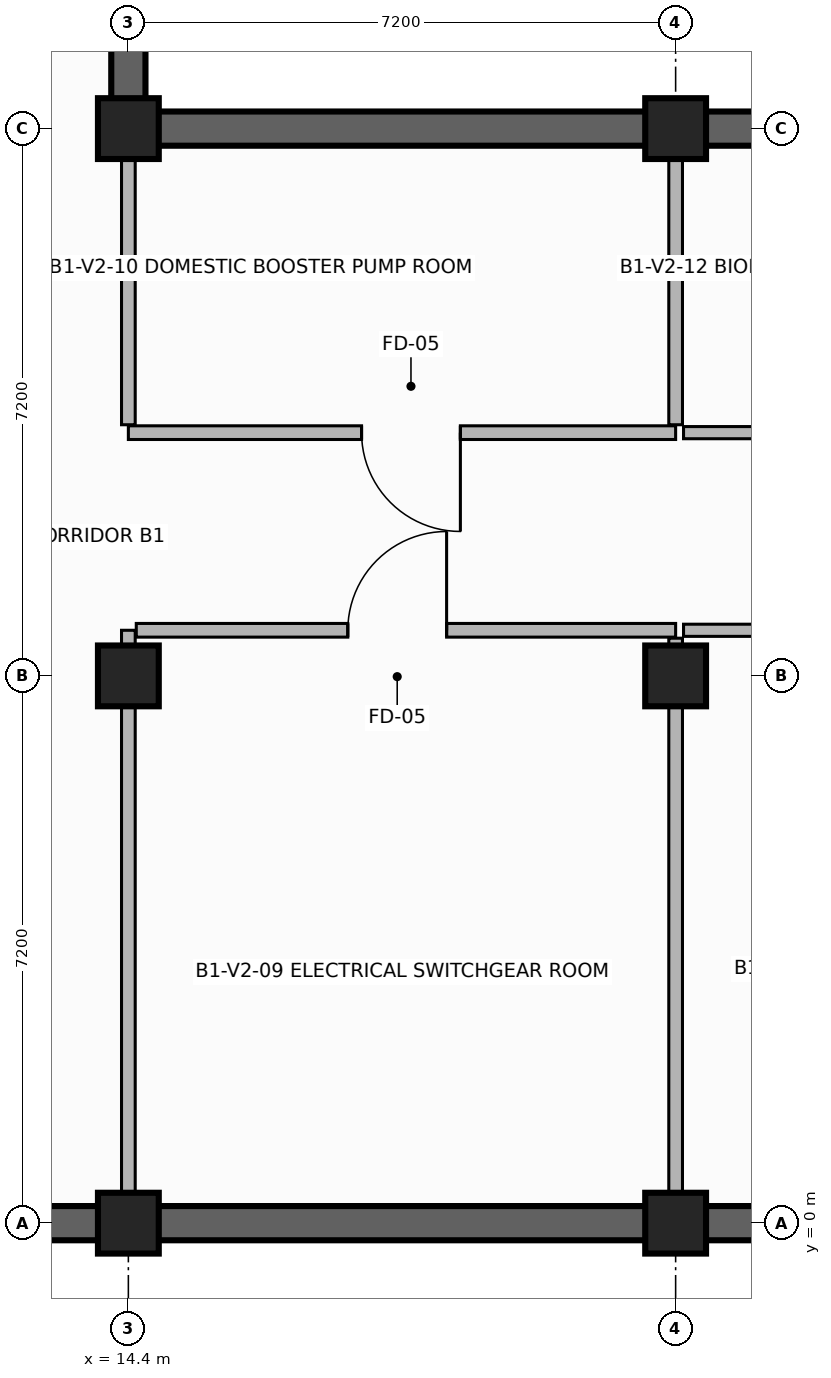
"""IFC4 building model, lengths in metres.
Left out: names, types, materials, properties, quantities, classifications, styles, units other than length and angle.
Written with IfcOpenShell. Run it as: python <this file> out.ifc"""

import sys

from ifc_helpers import new_model, si_unit, direction, frame, frame_2d, origin, origin_2d, place, context, subcontext, project, spatial, rectangle, extrude, element, fill, save


model = new_model("IFC4")
c1 = context("Model", 3, precision=1e-05, world=origin(), true_north=direction((0.0, 1.0)))
c2 = subcontext(c1, "Body", "Model", "MODEL_VIEW")
j1 = project(units=[si_unit("LENGTHUNIT", "METRE"), si_unit("PLANEANGLEUNIT", "RADIAN")], contexts=[c1])
p1 = place(None, origin())
s1 = spatial("IfcSite", under=j1, at=p1, CompositionType="ELEMENT")
p2 = place(p1, origin())
s2 = spatial("IfcBuilding", under=s1, at=p2, CompositionType="ELEMENT")
p3 = place(p2, frame((0.0, 0.0, -4.2)))
s3 = spatial("IfcBuildingStorey", under=s2, at=p3, CompositionType="ELEMENT", Elevation=-4.2)
for number, where, z_axis, x_axis in (
    (1, (14.4, 0.0, -0.4), (0.0, 0.0, 1.0), (1.0, 0.0, 0.0)),
    (2, (14.4, 7.2, -0.4), (0.0, 0.0, 1.0), (1.0, 0.0, 0.0)),
    (3, (14.4, 14.4, -0.4), (0.0, 0.0, 1.0), (1.0, 0.0, 0.0)),
    (4, (21.6, 0.0, -0.4), (0.0, 0.0, 1.0), (1.0, 0.0, 0.0)),
    (5, (21.6, 7.2, -0.4), (0.0, 0.0, 1.0), (1.0, 0.0, 0.0)),
    (6, (21.6, 14.4, -0.4), (0.0, 0.0, 1.0), (1.0, 0.0, 0.0)),
):
    element("IfcColumn", number, at=place(p3, frame(where, z_axis=z_axis, x_axis=x_axis)), inside=s3, PredefinedType="COLUMN", context=c2, shape_type="SweptSolid", body=[
        extrude(rectangle(XDim=0.8, YDim=0.8, at=origin_2d()), origin(), (0.0, 0.0, 1.0), 4.32),
    ])
p4 = place(p3, frame((7.2, 0.0, 0.0), z_axis=(0.0, 0.0, 1.0), x_axis=(1.0, 0.0, 0.0)))
e7 = element("IfcWall", 7, at=p4, inside=s3, PredefinedType="ELEMENTEDWALL", context=c2, shape_type="SweptSolid", body=[
    extrude(rectangle(XDim=7.2, YDim=0.45, at=frame_2d((3.6, 0.0))), origin(), (0.0, 0.0, 1.0), 3.32),
])
p5 = place(p3, frame((14.4, 0.0, 0.0), z_axis=(0.0, 0.0, 1.0), x_axis=(1.0, 0.0, 0.0)))
e8 = element("IfcWall", 8, at=p5, inside=s3, PredefinedType="ELEMENTEDWALL", context=c2, shape_type="SweptSolid", body=[
    extrude(rectangle(XDim=7.2, YDim=0.45, at=frame_2d((3.6, 0.0))), origin(), (0.0, 0.0, 1.0), 3.32),
])
for number, where, z_axis, x_axis in (
    (9, (21.6, 0.0, 0.0), (0.0, 0.0, 1.0), (1.0, 0.0, 0.0)),
    (10, (28.8, 14.4, 0.0), (0.0, 0.0, 1.0), (-1.0, 0.0, 0.0)),
):
    element("IfcWall", number, at=place(p3, frame(where, z_axis=z_axis, x_axis=x_axis)), inside=s3, PredefinedType="ELEMENTEDWALL", context=c2, shape_type="SweptSolid", body=[
        extrude(rectangle(XDim=7.2, YDim=0.45, at=frame_2d((3.6, 0.0))), origin(), (0.0, 0.0, 1.0), 3.32),
    ])
for number, where, z_axis, x_axis in (
    (11, (21.6, 14.4, 0.0), (0.0, 0.0, 1.0), (-1.0, 0.0, 0.0)),
    (12, (14.4, 14.4, 0.0), (0.0, 0.0, 1.0), (0.0, 1.0, 0.0)),
):
    element("IfcWall", number, at=place(p3, frame(where, z_axis=z_axis, x_axis=x_axis)), inside=s3, PredefinedType="ELEMENTEDWALL", context=c2, shape_type="SweptSolid", body=[
        extrude(rectangle(XDim=7.2, YDim=0.45, at=frame_2d((3.6, 0.0))), origin(), (0.0, 0.0, 1.0), 3.32),
    ])
p6 = place(p3, frame((14.4, 0.24, 0.0), z_axis=(0.0, 0.0, 1.0), x_axis=(0.0, 1.0, 0.0)))
e13 = element("IfcWall", 13, at=p6, inside=s3, PredefinedType="PARTITIONING", context=c2, shape_type="SweptSolid", body=[
    extrude(rectangle(XDim=7.56, YDim=0.18, at=frame_2d((3.78, 0.0))), origin(), (0.0, 0.0, 1.0), 3.26),
])
p7 = place(p3, frame((14.504, 7.8, 0.0), z_axis=(0.0, 0.0, 1.0), x_axis=(1.0, 0.0, 0.0)))
e14 = element("IfcWall", 14, at=p7, inside=s3, PredefinedType="PARTITIONING", context=c2, shape_type="SweptSolid", body=[
    extrude(rectangle(XDim=7.096, YDim=0.18, at=frame_2d((3.548, 0.0))), origin(), (0.0, 0.0, 1.0), 3.26),
])
p8 = place(p7, frame((2.783, 0.0, 0.0)))
e15 = element("IfcOpeningElement", 15, at=p8, cuts=e14, PredefinedType="OPENING", context=c2, shape_type="SweptSolid", body=[
    extrude(rectangle(XDim=1.3, YDim=2.2, at=frame_2d((0.65, 1.1))), frame((0.0, 0.1, 0.0), z_axis=(0.0, -1.0, 0.0), x_axis=(1.0, 0.0, 0.0)), (0.0, 0.0, 1.0), 0.2),
])
p9 = place(p3, frame((21.6, 7.696, 0.0), z_axis=(0.0, 0.0, 1.0), x_axis=(0.0, -1.0, 0.0)))
e16 = element("IfcWall", 16, at=p9, inside=s3, PredefinedType="PARTITIONING", context=c2, shape_type="SweptSolid", body=[
    extrude(rectangle(XDim=7.456, YDim=0.18, at=frame_2d((3.728, 0.0))), origin(), (0.0, 0.0, 1.0), 3.26),
])
p10 = place(p3, frame((21.6, 10.4, 0.0), z_axis=(0.0, 0.0, 1.0), x_axis=(-1.0, 0.0, 0.0)))
e17 = element("IfcWall", 17, at=p10, inside=s3, PredefinedType="PARTITIONING", context=c2, shape_type="SweptSolid", body=[
    extrude(rectangle(XDim=7.2, YDim=0.18, at=frame_2d((3.6, 0.0))), origin(), (0.0, 0.0, 1.0), 3.26),
])
p11 = place(p10, frame((2.832, 0.0, 0.0)))
e18 = element("IfcOpeningElement", 18, at=p11, cuts=e17, PredefinedType="OPENING", context=c2, shape_type="SweptSolid", body=[
    extrude(rectangle(XDim=1.3, YDim=2.2, at=frame_2d((0.65, 1.1))), frame((0.0, 0.1, 0.0), z_axis=(0.0, -1.0, 0.0), x_axis=(1.0, 0.0, 0.0)), (0.0, 0.0, 1.0), 0.2),
])
for number, where, z_axis, x_axis in (
    (19, (14.4, 10.504, 0.0), (0.0, 0.0, 1.0), (0.0, 1.0, 0.0)),
    (20, (21.6, 14.16, 0.0), (0.0, 0.0, 1.0), (0.0, -1.0, 0.0)),
):
    element("IfcWall", number, at=place(p3, frame(where, z_axis=z_axis, x_axis=x_axis)), inside=s3, PredefinedType="PARTITIONING", context=c2, shape_type="SweptSolid", body=[
        extrude(rectangle(XDim=3.656, YDim=0.18, at=frame_2d((1.828, 0.0))), origin(), (0.0, 0.0, 1.0), 3.26),
    ])
p12 = place(p3, frame((21.704, 7.8, 0.0), z_axis=(0.0, 0.0, 1.0), x_axis=(1.0, 0.0, 0.0)))
e21 = element("IfcWall", 21, at=p12, inside=s3, PredefinedType="PARTITIONING", context=c2, shape_type="SweptSolid", body=[
    extrude(rectangle(XDim=7.096, YDim=0.16, at=frame_2d((3.548, 0.0))), origin(), (0.0, 0.0, 1.0), 3.26),
])
p13 = place(p12, frame((3.058, 0.0, 0.0)))
e22 = element("IfcOpeningElement", 22, at=p13, cuts=e21, PredefinedType="OPENING", context=c2, shape_type="SweptSolid", body=[
    extrude(rectangle(XDim=0.98, YDim=2.15, at=frame_2d((0.49, 1.075))), frame((0.0, 0.09, 0.0), z_axis=(0.0, -1.0, 0.0), x_axis=(1.0, 0.0, 0.0)), (0.0, 0.0, 1.0), 0.18),
])
p14 = place(p3, frame((28.8, 10.4, 0.0), z_axis=(0.0, 0.0, 1.0), x_axis=(-1.0, 0.0, 0.0)))
e23 = element("IfcWall", 23, at=p14, inside=s3, PredefinedType="PARTITIONING", context=c2, shape_type="SweptSolid", body=[
    extrude(rectangle(XDim=7.096, YDim=0.16, at=frame_2d((3.548, 0.0))), origin(), (0.0, 0.0, 1.0), 3.26),
])
p15 = place(p14, frame((3.058, 0.0, 0.0)))
e24 = element("IfcOpeningElement", 24, at=p15, cuts=e23, PredefinedType="OPENING", context=c2, shape_type="SweptSolid", body=[
    extrude(rectangle(XDim=0.98, YDim=2.15, at=frame_2d((0.49, 1.075))), frame((0.0, 0.09, 0.0), z_axis=(0.0, -1.0, 0.0), x_axis=(1.0, 0.0, 0.0)), (0.0, 0.0, 1.0), 0.18),
])
p16 = place(p8, origin())
e25 = element("IfcDoor", 25, at=p16, inside=s3, OperationType="SINGLE_SWING_RIGHT", PredefinedType="DOOR", context=c2, shape_type="SweptSolid", body=[
    extrude(rectangle(XDim=1.3, YDim=2.2, at=frame_2d((0.65, 1.1))), frame((0.0, 0.025, 0.0), z_axis=(0.0, -1.0, 0.0), x_axis=(1.0, 0.0, 0.0)), (0.0, 0.0, 1.0), 0.05),
])
fill(e15, e25)
p17 = place(p11, origin())
e26 = element("IfcDoor", 26, at=p17, inside=s3, OperationType="SINGLE_SWING_LEFT", PredefinedType="DOOR", context=c2, shape_type="SweptSolid", body=[
    extrude(rectangle(XDim=1.3, YDim=2.2, at=frame_2d((0.65, 1.1))), frame((0.0, 0.025, 0.0), z_axis=(0.0, -1.0, 0.0), x_axis=(1.0, 0.0, 0.0)), (0.0, 0.0, 1.0), 0.05),
])
fill(e18, e26)
save(model, sys.argv[1])
